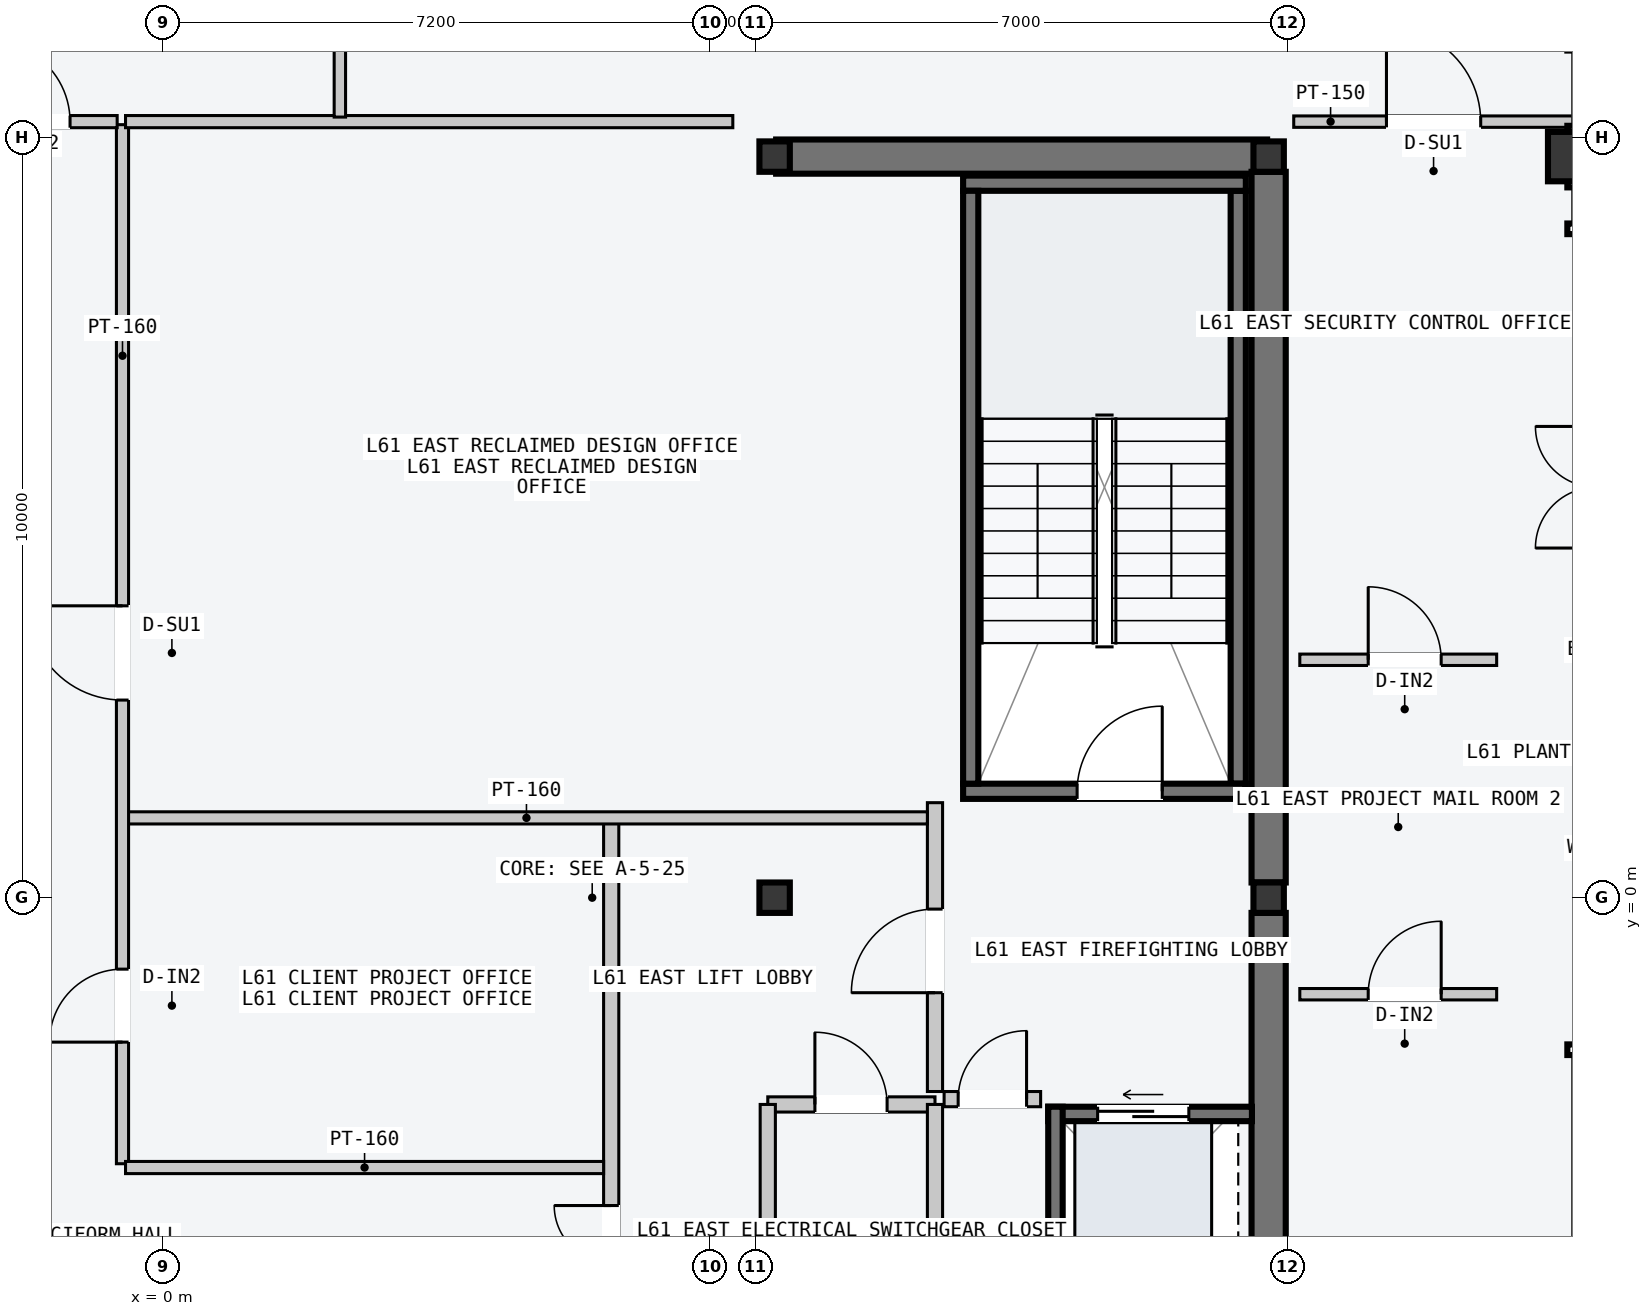
"""IFC4 building model, lengths in metres.
Left out: names, types, materials, properties, quantities, classifications, styles, units other than length and angle.
Written with IfcOpenShell. Run it as: python <this file> out.ifc"""

import sys

from ifc_helpers import new_model, si_unit, direction, frame, frame_2d, origin, origin_2d, place, context, subcontext, project, spatial, rectangle, hollow_rectangle, i_section, extrude, element, fill, save


model = new_model("IFC4")
c1 = context("Model", 3, precision=1e-05, world=origin(), true_north=direction((0.0, 1.0)))
c2 = subcontext(c1, "Body", "Model", "MODEL_VIEW")
j1 = project(units=[si_unit("LENGTHUNIT", "METRE"), si_unit("PLANEANGLEUNIT", "RADIAN")], contexts=[c1])
p1 = place(None, origin())
s1 = spatial("IfcSite", under=j1, at=p1, CompositionType="ELEMENT")
p2 = place(p1, origin())
s2 = spatial("IfcBuilding", under=s1, at=p2, CompositionType="ELEMENT")
p3 = place(p2, frame((0.0, 0.0, 232.8)))
s3 = spatial("IfcBuildingStorey", under=s2, at=p3, CompositionType="ELEMENT", Elevation=232.8)
p4 = place(p3, frame((8.07, 9.75, -0.2), z_axis=(0.0, 0.0, 1.0), x_axis=(1.0, 0.0, 0.0)))
e1 = element("IfcWall", 1, at=p4, inside=s3, PredefinedType="SHEAR", context=c2, shape_type="SweptSolid", body=[
    extrude(rectangle(XDim=6.46, YDim=0.45, at=frame_2d((3.23, 0.0))), origin(), (0.0, 0.0, 1.0), 3.6),
])
for number, where, z_axis, x_axis in (
    (2, (14.55, -9.55, -0.2), (0.0, 0.0, 1.0), (0.0, 1.0, 0.0)),
    (3, (14.55, 0.2, -0.2), (0.0, 0.0, 1.0), (0.0, 1.0, 0.0)),
):
    element("IfcWall", number, at=place(p3, frame(where, z_axis=z_axis, x_axis=x_axis)), inside=s3, PredefinedType="SHEAR", context=c2, shape_type="SweptSolid", body=[
        extrude(rectangle(XDim=9.35, YDim=0.45, at=frame_2d((4.675, 0.0))), origin(), (0.0, 0.0, 1.0), 3.6),
    ])
p5 = place(p3, frame((14.15, 1.5, -0.2), z_axis=(0.0, 0.0, 1.0), x_axis=(0.0, 1.0, 0.0)))
e4 = element("IfcWall", 4, at=p5, inside=s3, PredefinedType="SOLIDWALL", context=c2, shape_type="SweptSolid", body=[
    extrude(rectangle(XDim=7.8, YDim=0.2, at=frame_2d((3.9, 0.0))), origin(), (0.0, 0.0, 1.0), 3.6),
])
p6 = place(p3, frame((10.53, 1.4, -0.2), z_axis=(0.0, 0.0, 1.0), x_axis=(1.0, 0.0, 0.0)))
e5 = element("IfcWall", 5, at=p6, inside=s3, PredefinedType="SOLIDWALL", context=c2, shape_type="SweptSolid", body=[
    extrude(rectangle(XDim=3.72, YDim=0.2, at=frame_2d((1.86, 0.0))), origin(), (0.0, 0.0, 1.0), 3.6),
])
p7 = place(p6, frame((1.5, 0.0, 0.2)))
e6 = element("IfcOpeningElement", 6, at=p7, cuts=e5, PredefinedType="OPENING", context=c2, shape_type="SweptSolid", body=[
    extrude(rectangle(XDim=1.12, YDim=2.18, at=frame_2d((0.56, 1.09))), frame((0.0, 0.11, 0.0), z_axis=(0.0, -1.0, 0.0), x_axis=(1.0, 0.0, 0.0)), (0.0, 0.0, 1.0), 0.22),
])
p8 = place(p3, frame((10.53, 9.4, -0.2), z_axis=(0.0, 0.0, 1.0), x_axis=(1.0, 0.0, 0.0)))
e7 = element("IfcWall", 7, at=p8, inside=s3, PredefinedType="SOLIDWALL", context=c2, shape_type="SweptSolid", body=[
    extrude(rectangle(XDim=3.72, YDim=0.2, at=frame_2d((1.86, 0.0))), origin(), (0.0, 0.0, 1.0), 3.6),
])
p9 = place(p3, frame((10.63, 1.5, -0.2), z_axis=(0.0, 0.0, 1.0), x_axis=(0.0, 1.0, 0.0)))
e8 = element("IfcWall", 8, at=p9, inside=s3, PredefinedType="SOLIDWALL", context=c2, shape_type="SweptSolid", body=[
    extrude(rectangle(XDim=7.8, YDim=0.2, at=frame_2d((3.9, 0.0))), origin(), (0.0, 0.0, 1.0), 3.6),
])
for number, where, z_axis, x_axis in (
    (9, (8.05, 0.0, 0.0), (0.0, 0.0, 1.0), (1.0, 0.0, 0.0)),
    (10, (8.05, 9.75, 0.0), (0.0, 0.0, 1.0), (1.0, 0.0, 0.0)),
    (11, (14.55, 0.0, 0.0), (0.0, 0.0, 1.0), (1.0, 0.0, 0.0)),
    (12, (14.55, 9.75, 0.0), (0.0, 0.0, 1.0), (1.0, 0.0, 0.0)),
):
    element("IfcColumn", number, at=place(p3, frame(where, z_axis=z_axis, x_axis=x_axis)), inside=s3, PredefinedType="COLUMN", context=c2, shape_type="SweptSolid", body=[
        extrude(i_section(OverallWidth=0.4, OverallDepth=0.4, WebThickness=0.013, FlangeThickness=0.021, at=origin_2d()), origin(), (0.0, 0.0, 1.0), 3.6),
    ])
p10 = place(p3, frame((18.55, 9.75, 0.0), z_axis=(0.0, 0.0, 1.0), x_axis=(0.0, 1.0, 0.0)))
e13 = element("IfcColumn", 13, at=p10, inside=s3, PredefinedType="COLUMN", context=c2, shape_type="SweptSolid", body=[
    extrude(hollow_rectangle(XDim=0.65, YDim=0.65, WallThickness=0.028, at=origin_2d()), origin(), (0.0, 0.0, 1.0), 3.6),
])
p11 = place(p3, frame((11.65, -2.845, -0.2), z_axis=(0.0, 0.0, 1.0), x_axis=(1.0, 0.0, 0.0)))
e14 = element("IfcWall", 14, at=p11, inside=s3, PredefinedType="SOLIDWALL", context=c2, shape_type="SweptSolid", body=[
    extrude(rectangle(XDim=2.68, YDim=0.19, at=frame_2d((1.34, 0.0))), origin(), (0.0, 0.0, 1.0), 3.6),
])
p12 = place(p11, frame((0.65, 0.0, 0.2)))
e15 = element("IfcOpeningElement", 15, at=p12, cuts=e14, PredefinedType="OPENING", context=c2, shape_type="SweptSolid", body=[
    extrude(rectangle(XDim=1.2, YDim=2.2, at=frame_2d((0.6, 1.1))), frame((0.0, 0.105, 0.0), z_axis=(0.0, -1.0, 0.0), x_axis=(1.0, 0.0, 0.0)), (0.0, 0.0, 1.0), 0.21),
])
p13 = place(p3, frame((11.745, -5.35, -0.2), z_axis=(0.0, 0.0, 1.0), x_axis=(0.0, 1.0, 0.0)))
e16 = element("IfcWall", 16, at=p13, inside=s3, PredefinedType="SOLIDWALL", context=c2, shape_type="SweptSolid", body=[
    extrude(rectangle(XDim=2.6, YDim=0.19, at=frame_2d((1.3, 0.0))), origin(), (0.0, 0.0, 1.0), 3.6),
])
p14 = place(p3, frame((5.9, -9.45, 0.0), z_axis=(0.0, 0.0, 1.0), x_axis=(0.0, 1.0, 0.0)))
e17 = element("IfcWall", 17, at=p14, inside=s3, PredefinedType="PARTITIONING", context=c2, shape_type="SweptSolid", body=[
    extrude(rectangle(XDim=10.5, YDim=0.2, at=frame_2d((5.25, 0.0))), origin(), (0.0, 0.0, 1.0), 3.4),
])
p15 = place(p14, frame((3.9, 0.0, 0.0)))
e18 = element("IfcOpeningElement", 18, at=p15, cuts=e17, PredefinedType="OPENING", context=c2, shape_type="SweptSolid", body=[
    extrude(rectangle(XDim=1.5, YDim=2.2, at=frame_2d((0.75, 1.1))), frame((0.0, 0.11, 0.0), z_axis=(0.0, -1.0, 0.0), x_axis=(1.0, 0.0, 0.0)), (0.0, 0.0, 1.0), 0.22),
])
p16 = place(p3, frame((10.16, -2.55, 0.0), z_axis=(0.0, 0.0, 1.0), x_axis=(0.0, 1.0, 0.0)))
e19 = element("IfcWall", 19, at=p16, inside=s3, PredefinedType="PARTITIONING", context=c2, shape_type="SweptSolid", body=[
    extrude(rectangle(XDim=3.8, YDim=0.2, at=frame_2d((1.9, 0.0))), origin(), (0.0, 0.0, 1.0), 3.4),
])
p17 = place(p16, frame((1.3, 0.0, 0.0)))
e20 = element("IfcOpeningElement", 20, at=p17, cuts=e19, PredefinedType="OPENING", context=c2, shape_type="SweptSolid", body=[
    extrude(rectangle(XDim=1.1, YDim=2.15, at=frame_2d((0.55, 1.075))), frame((0.0, 0.11, 0.0), z_axis=(0.0, -1.0, 0.0), x_axis=(1.0, 0.0, 0.0)), (0.0, 0.0, 1.0), 0.22),
])
p18 = place(p3, frame((10.28, -2.65, 0.0), z_axis=(0.0, 0.0, 1.0), x_axis=(1.0, 0.0, 0.0)))
e21 = element("IfcWall", 21, at=p18, inside=s3, PredefinedType="PARTITIONING", context=c2, shape_type="SweptSolid", body=[
    extrude(rectangle(XDim=1.27, YDim=0.2, at=frame_2d((0.635, 0.0))), origin(), (0.0, 0.0, 1.0), 3.4),
])
p19 = place(p18, frame((0.185, 0.0, 0.0)))
e22 = element("IfcOpeningElement", 22, at=p19, cuts=e21, PredefinedType="OPENING", context=c2, shape_type="SweptSolid", body=[
    extrude(rectangle(XDim=0.9, YDim=2.15, at=frame_2d((0.45, 1.075))), frame((0.0, 0.11, 0.0), z_axis=(0.0, -1.0, 0.0), x_axis=(1.0, 0.0, 0.0)), (0.0, 0.0, 1.0), 0.22),
])
p20 = place(p3, frame((7.96, -2.72, 0.0), z_axis=(0.0, 0.0, 1.0), x_axis=(1.0, 0.0, 0.0)))
e23 = element("IfcWall", 23, at=p20, inside=s3, PredefinedType="PARTITIONING", context=c2, shape_type="SweptSolid", body=[
    extrude(rectangle(XDim=2.2, YDim=0.2, at=frame_2d((1.1, 0.0))), origin(), (0.0, 0.0, 1.0), 3.4),
])
p21 = place(p20, frame((0.62, 0.0, 0.0)))
e24 = element("IfcOpeningElement", 24, at=p21, cuts=e23, PredefinedType="OPENING", context=c2, shape_type="SweptSolid", body=[
    extrude(rectangle(XDim=0.95, YDim=2.1, at=frame_2d((0.475, 1.05))), frame((0.0, 0.11, 0.0), z_axis=(0.0, -1.0, 0.0), x_axis=(1.0, 0.0, 0.0)), (0.0, 0.0, 1.0), 0.22),
])
for number, where, z_axis, x_axis in (
    (25, (7.96, -5.16, 0.0), (0.0, 0.0, 1.0), (0.0, 1.0, 0.0)),
    (26, (10.16, -5.16, 0.0), (0.0, 0.0, 1.0), (0.0, 1.0, 0.0)),
):
    element("IfcWall", number, at=place(p3, frame(where, z_axis=z_axis, x_axis=x_axis)), inside=s3, PredefinedType="PARTITIONING", context=c2, shape_type="SweptSolid", body=[
        extrude(rectangle(XDim=2.44, YDim=0.2, at=frame_2d((1.22, 0.0))), origin(), (0.0, 0.0, 1.0), 3.4),
    ])
p22 = place(p3, frame((-0.49, 1.05, 0.0), z_axis=(0.0, 0.0, 1.0), x_axis=(1.0, 0.0, 0.0)))
e27 = element("IfcWall", 27, at=p22, inside=s3, PredefinedType="PARTITIONING", context=c2, shape_type="SweptSolid", body=[
    extrude(rectangle(XDim=10.55, YDim=0.16, at=frame_2d((5.275, 0.0))), origin(), (0.0, 0.0, 1.0), 3.4),
])
p23 = place(p3, frame((-0.53, -3.5, 0.0), z_axis=(0.0, 0.0, 1.0), x_axis=(0.0, 1.0, 0.0)))
e28 = element("IfcWall", 28, at=p23, inside=s3, PredefinedType="PARTITIONING", context=c2, shape_type="SweptSolid", body=[
    extrude(rectangle(XDim=13.67, YDim=0.16, at=frame_2d((6.835, 0.0))), origin(), (0.0, 0.0, 1.0), 3.4),
])
p24 = place(p23, frame((6.1, 0.0, 0.0)))
e29 = element("IfcOpeningElement", 29, at=p24, cuts=e28, PredefinedType="OPENING", context=c2, shape_type="SweptSolid", body=[
    extrude(rectangle(XDim=1.24, YDim=2.24, at=frame_2d((0.62, 1.12))), frame((0.0, 0.09, 0.0), z_axis=(0.0, -1.0, 0.0), x_axis=(1.0, 0.0, 0.0)), (0.0, 0.0, 1.0), 0.18),
])
p25 = place(p23, frame((1.6, 0.0, 0.0)))
e30 = element("IfcOpeningElement", 30, at=p25, cuts=e28, PredefinedType="OPENING", context=c2, shape_type="SweptSolid", body=[
    extrude(rectangle(XDim=0.96, YDim=2.18, at=frame_2d((0.48, 1.09))), frame((0.0, 0.09, 0.0), z_axis=(0.0, -1.0, 0.0), x_axis=(1.0, 0.0, 0.0)), (0.0, 0.0, 1.0), 0.18),
])
p26 = place(p3, frame((-0.49, 10.21, 0.0), z_axis=(0.0, 0.0, 1.0), x_axis=(1.0, 0.0, 0.0)))
e31 = element("IfcWall", 31, at=p26, inside=s3, PredefinedType="PARTITIONING", context=c2, shape_type="SweptSolid", body=[
    extrude(rectangle(XDim=7.99, YDim=0.16, at=frame_2d((3.995, 0.0))), origin(), (0.0, 0.0, 1.0), 3.4),
])
p27 = place(p3, frame((-0.49, -3.55, 0.0), z_axis=(0.0, 0.0, 1.0), x_axis=(1.0, 0.0, 0.0)))
e32 = element("IfcWall", 32, at=p27, inside=s3, PredefinedType="PARTITIONING", context=c2, shape_type="SweptSolid", body=[
    extrude(rectangle(XDim=6.29, YDim=0.16, at=frame_2d((3.145, 0.0))), origin(), (0.0, 0.0, 1.0), 3.4),
])
p28 = place(p3, frame((2.33, 10.27, 0.0), z_axis=(0.0, 0.0, 1.0), x_axis=(0.0, 1.0, 0.0)))
e33 = element("IfcWall", 33, at=p28, inside=s3, PredefinedType="PARTITIONING", context=c2, shape_type="SweptSolid", body=[
    extrude(rectangle(XDim=6.28, YDim=0.15, at=frame_2d((3.14, 0.0))), origin(), (0.0, 0.0, 1.0), 3.4),
])
p29 = place(p28, frame((1.15, 0.0, 0.0)))
e34 = element("IfcOpeningElement", 34, at=p29, cuts=e33, PredefinedType="OPENING", context=c2, shape_type="SweptSolid", body=[
    extrude(rectangle(XDim=0.96, YDim=2.18, at=frame_2d((0.48, 1.09))), frame((0.0, 0.085, 0.0), z_axis=(0.0, -1.0, 0.0), x_axis=(1.0, 0.0, 0.0)), (0.0, 0.0, 1.0), 0.17),
])
p30 = place(p3, frame((-2.9, 10.21, 0.0), z_axis=(0.0, 0.0, 1.0), x_axis=(1.0, 0.0, 0.0)))
e35 = element("IfcWall", 35, at=p30, inside=s3, PredefinedType="PARTITIONING", context=c2, shape_type="SweptSolid", body=[
    extrude(rectangle(XDim=2.3, YDim=0.16, at=frame_2d((1.15, 0.0))), origin(), (0.0, 0.0, 1.0), 3.4),
])
p31 = place(p30, frame((0.62, 0.0, 0.0)))
e36 = element("IfcOpeningElement", 36, at=p31, cuts=e35, PredefinedType="OPENING", context=c2, shape_type="SweptSolid", body=[
    extrude(rectangle(XDim=1.06, YDim=2.2, at=frame_2d((0.53, 1.1))), frame((0.0, 0.09, 0.0), z_axis=(0.0, -1.0, 0.0), x_axis=(1.0, 0.0, 0.0)), (0.0, 0.0, 1.0), 0.18),
])
p32 = place(p3, frame((14.88, 10.21, 0.0), z_axis=(0.0, 0.0, 1.0), x_axis=(1.0, 0.0, 0.0)))
e37 = element("IfcWall", 37, at=p32, inside=s3, PredefinedType="PARTITIONING", context=c2, shape_type="SweptSolid", body=[
    extrude(rectangle(XDim=3.68, YDim=0.15, at=frame_2d((1.84, 0.0))), origin(), (0.0, 0.0, 1.0), 3.4),
])
p33 = place(p32, frame((1.22, 0.0, 0.0)))
e38 = element("IfcOpeningElement", 38, at=p33, cuts=e37, PredefinedType="OPENING", context=c2, shape_type="SweptSolid", body=[
    extrude(rectangle(XDim=1.24, YDim=2.24, at=frame_2d((0.62, 1.12))), frame((0.0, 0.085, 0.0), z_axis=(0.0, -1.0, 0.0), x_axis=(1.0, 0.0, 0.0)), (0.0, 0.0, 1.0), 0.17),
])
p34 = place(p3, frame((14.96, -1.27, 0.0), z_axis=(0.0, 0.0, 1.0), x_axis=(1.0, 0.0, 0.0)))
e39 = element("IfcWall", 39, at=p34, inside=s3, PredefinedType="PARTITIONING", context=c2, shape_type="SweptSolid", body=[
    extrude(rectangle(XDim=2.59, YDim=0.15, at=frame_2d((1.295, 0.0))), origin(), (0.0, 0.0, 1.0), 3.4),
])
p35 = place(p34, frame((0.9, 0.0, 0.0)))
e40 = element("IfcOpeningElement", 40, at=p35, cuts=e39, PredefinedType="OPENING", context=c2, shape_type="SweptSolid", body=[
    extrude(rectangle(XDim=0.96, YDim=2.18, at=frame_2d((0.48, 1.09))), frame((0.0, 0.085, 0.0), z_axis=(0.0, -1.0, 0.0), x_axis=(1.0, 0.0, 0.0)), (0.0, 0.0, 1.0), 0.17),
])
p36 = place(p3, frame((14.96, 3.13, 0.0), z_axis=(0.0, 0.0, 1.0), x_axis=(1.0, 0.0, 0.0)))
e41 = element("IfcWall", 41, at=p36, inside=s3, PredefinedType="PARTITIONING", context=c2, shape_type="SweptSolid", body=[
    extrude(rectangle(XDim=2.59, YDim=0.15, at=frame_2d((1.295, 0.0))), origin(), (0.0, 0.0, 1.0), 3.4),
])
p37 = place(p36, frame((0.9, 0.0, 0.0)))
e42 = element("IfcOpeningElement", 42, at=p37, cuts=e41, PredefinedType="OPENING", context=c2, shape_type="SweptSolid", body=[
    extrude(rectangle(XDim=0.96, YDim=2.18, at=frame_2d((0.48, 1.09))), frame((0.0, 0.085, 0.0), z_axis=(0.0, -1.0, 0.0), x_axis=(1.0, 0.0, 0.0)), (0.0, 0.0, 1.0), 0.17),
])
p38 = place(p7, origin())
e43 = element("IfcDoor", 43, at=p38, inside=s3, OperationType="SINGLE_SWING_RIGHT", PredefinedType="DOOR", context=c2, shape_type="SweptSolid", body=[
    extrude(rectangle(XDim=1.12, YDim=2.18, at=frame_2d((0.56, 1.09))), frame((0.0, 0.025, 0.0), z_axis=(0.0, -1.0, 0.0), x_axis=(1.0, 0.0, 0.0)), (0.0, 0.0, 1.0), 0.05),
])
fill(e6, e43)
p39 = place(p12, origin())
e44 = element("IfcDoor", 44, at=p39, inside=s3, OperationType="SLIDING_TO_LEFT", PredefinedType="DOOR", context=c2, shape_type="SweptSolid", body=[
    extrude(rectangle(XDim=1.2, YDim=2.2, at=frame_2d((0.6, 1.1))), frame((0.0, 0.025, 0.0), z_axis=(0.0, -1.0, 0.0), x_axis=(1.0, 0.0, 0.0)), (0.0, 0.0, 1.0), 0.05),
])
fill(e15, e44)
p40 = place(p15, origin())
e45 = element("IfcDoor", 45, at=p40, inside=s3, OperationType="DOUBLE_DOOR_SINGLE_SWING", PredefinedType="DOOR", context=c2, shape_type="SweptSolid", body=[
    extrude(rectangle(XDim=1.5, YDim=2.2, at=frame_2d((0.75, 1.1))), frame((0.0, 0.025, 0.0), z_axis=(0.0, -1.0, 0.0), x_axis=(1.0, 0.0, 0.0)), (0.0, 0.0, 1.0), 0.05),
])
fill(e18, e45)
p41 = place(p17, origin())
e46 = element("IfcDoor", 46, at=p41, inside=s3, OperationType="SINGLE_SWING_LEFT", PredefinedType="DOOR", context=c2, shape_type="SweptSolid", body=[
    extrude(rectangle(XDim=1.1, YDim=2.15, at=frame_2d((0.55, 1.075))), frame((0.0, 0.025, 0.0), z_axis=(0.0, -1.0, 0.0), x_axis=(1.0, 0.0, 0.0)), (0.0, 0.0, 1.0), 0.05),
])
fill(e20, e46)
p42 = place(p19, origin())
e47 = element("IfcDoor", 47, at=p42, inside=s3, OperationType="SINGLE_SWING_RIGHT", PredefinedType="DOOR", context=c2, shape_type="SweptSolid", body=[
    extrude(rectangle(XDim=0.9, YDim=2.15, at=frame_2d((0.45, 1.075))), frame((0.0, 0.025, 0.0), z_axis=(0.0, -1.0, 0.0), x_axis=(1.0, 0.0, 0.0)), (0.0, 0.0, 1.0), 0.05),
])
fill(e22, e47)
p43 = place(p21, origin())
e48 = element("IfcDoor", 48, at=p43, inside=s3, OperationType="SINGLE_SWING_LEFT", PredefinedType="DOOR", context=c2, shape_type="SweptSolid", body=[
    extrude(rectangle(XDim=0.95, YDim=2.1, at=frame_2d((0.475, 1.05))), frame((0.0, 0.025, 0.0), z_axis=(0.0, -1.0, 0.0), x_axis=(1.0, 0.0, 0.0)), (0.0, 0.0, 1.0), 0.05),
])
fill(e24, e48)
p44 = place(p24, origin())
e49 = element("IfcDoor", 49, at=p44, inside=s3, OperationType="SINGLE_SWING_RIGHT", PredefinedType="DOOR", context=c2, shape_type="SweptSolid", body=[
    extrude(rectangle(XDim=1.24, YDim=2.24, at=frame_2d((0.62, 1.12))), frame((0.0, 0.025, 0.0), z_axis=(0.0, -1.0, 0.0), x_axis=(1.0, 0.0, 0.0)), (0.0, 0.0, 1.0), 0.05),
])
fill(e29, e49)
p45 = place(p25, origin())
e50 = element("IfcDoor", 50, at=p45, inside=s3, OperationType="SINGLE_SWING_LEFT", PredefinedType="DOOR", context=c2, shape_type="SweptSolid", body=[
    extrude(rectangle(XDim=0.96, YDim=2.18, at=frame_2d((0.48, 1.09))), frame((0.0, 0.025, 0.0), z_axis=(0.0, -1.0, 0.0), x_axis=(1.0, 0.0, 0.0)), (0.0, 0.0, 1.0), 0.05),
])
fill(e30, e50)
p46 = place(p31, origin())
e51 = element("IfcDoor", 51, at=p46, inside=s3, OperationType="SINGLE_SWING_LEFT", PredefinedType="DOOR", context=c2, shape_type="SweptSolid", body=[
    extrude(rectangle(XDim=1.06, YDim=2.2, at=frame_2d((0.53, 1.1))), frame((0.0, 0.025, 0.0), z_axis=(0.0, -1.0, 0.0), x_axis=(1.0, 0.0, 0.0)), (0.0, 0.0, 1.0), 0.05),
])
fill(e36, e51)
p47 = place(p33, origin())
e52 = element("IfcDoor", 52, at=p47, inside=s3, OperationType="SINGLE_SWING_LEFT", PredefinedType="DOOR", context=c2, shape_type="SweptSolid", body=[
    extrude(rectangle(XDim=1.24, YDim=2.24, at=frame_2d((0.62, 1.12))), frame((0.0, 0.025, 0.0), z_axis=(0.0, -1.0, 0.0), x_axis=(1.0, 0.0, 0.0)), (0.0, 0.0, 1.0), 0.05),
])
fill(e38, e52)
p48 = place(p35, origin())
e53 = element("IfcDoor", 53, at=p48, inside=s3, OperationType="SINGLE_SWING_RIGHT", PredefinedType="DOOR", context=c2, shape_type="SweptSolid", body=[
    extrude(rectangle(XDim=0.96, YDim=2.18, at=frame_2d((0.48, 1.09))), frame((0.0, 0.025, 0.0), z_axis=(0.0, -1.0, 0.0), x_axis=(1.0, 0.0, 0.0)), (0.0, 0.0, 1.0), 0.05),
])
fill(e40, e53)
p49 = place(p37, origin())
e54 = element("IfcDoor", 54, at=p49, inside=s3, OperationType="SINGLE_SWING_LEFT", PredefinedType="DOOR", context=c2, shape_type="SweptSolid", body=[
    extrude(rectangle(XDim=0.96, YDim=2.18, at=frame_2d((0.48, 1.09))), frame((0.0, 0.025, 0.0), z_axis=(0.0, -1.0, 0.0), x_axis=(1.0, 0.0, 0.0)), (0.0, 0.0, 1.0), 0.05),
])
fill(e42, e54)
save(model, sys.argv[1])
